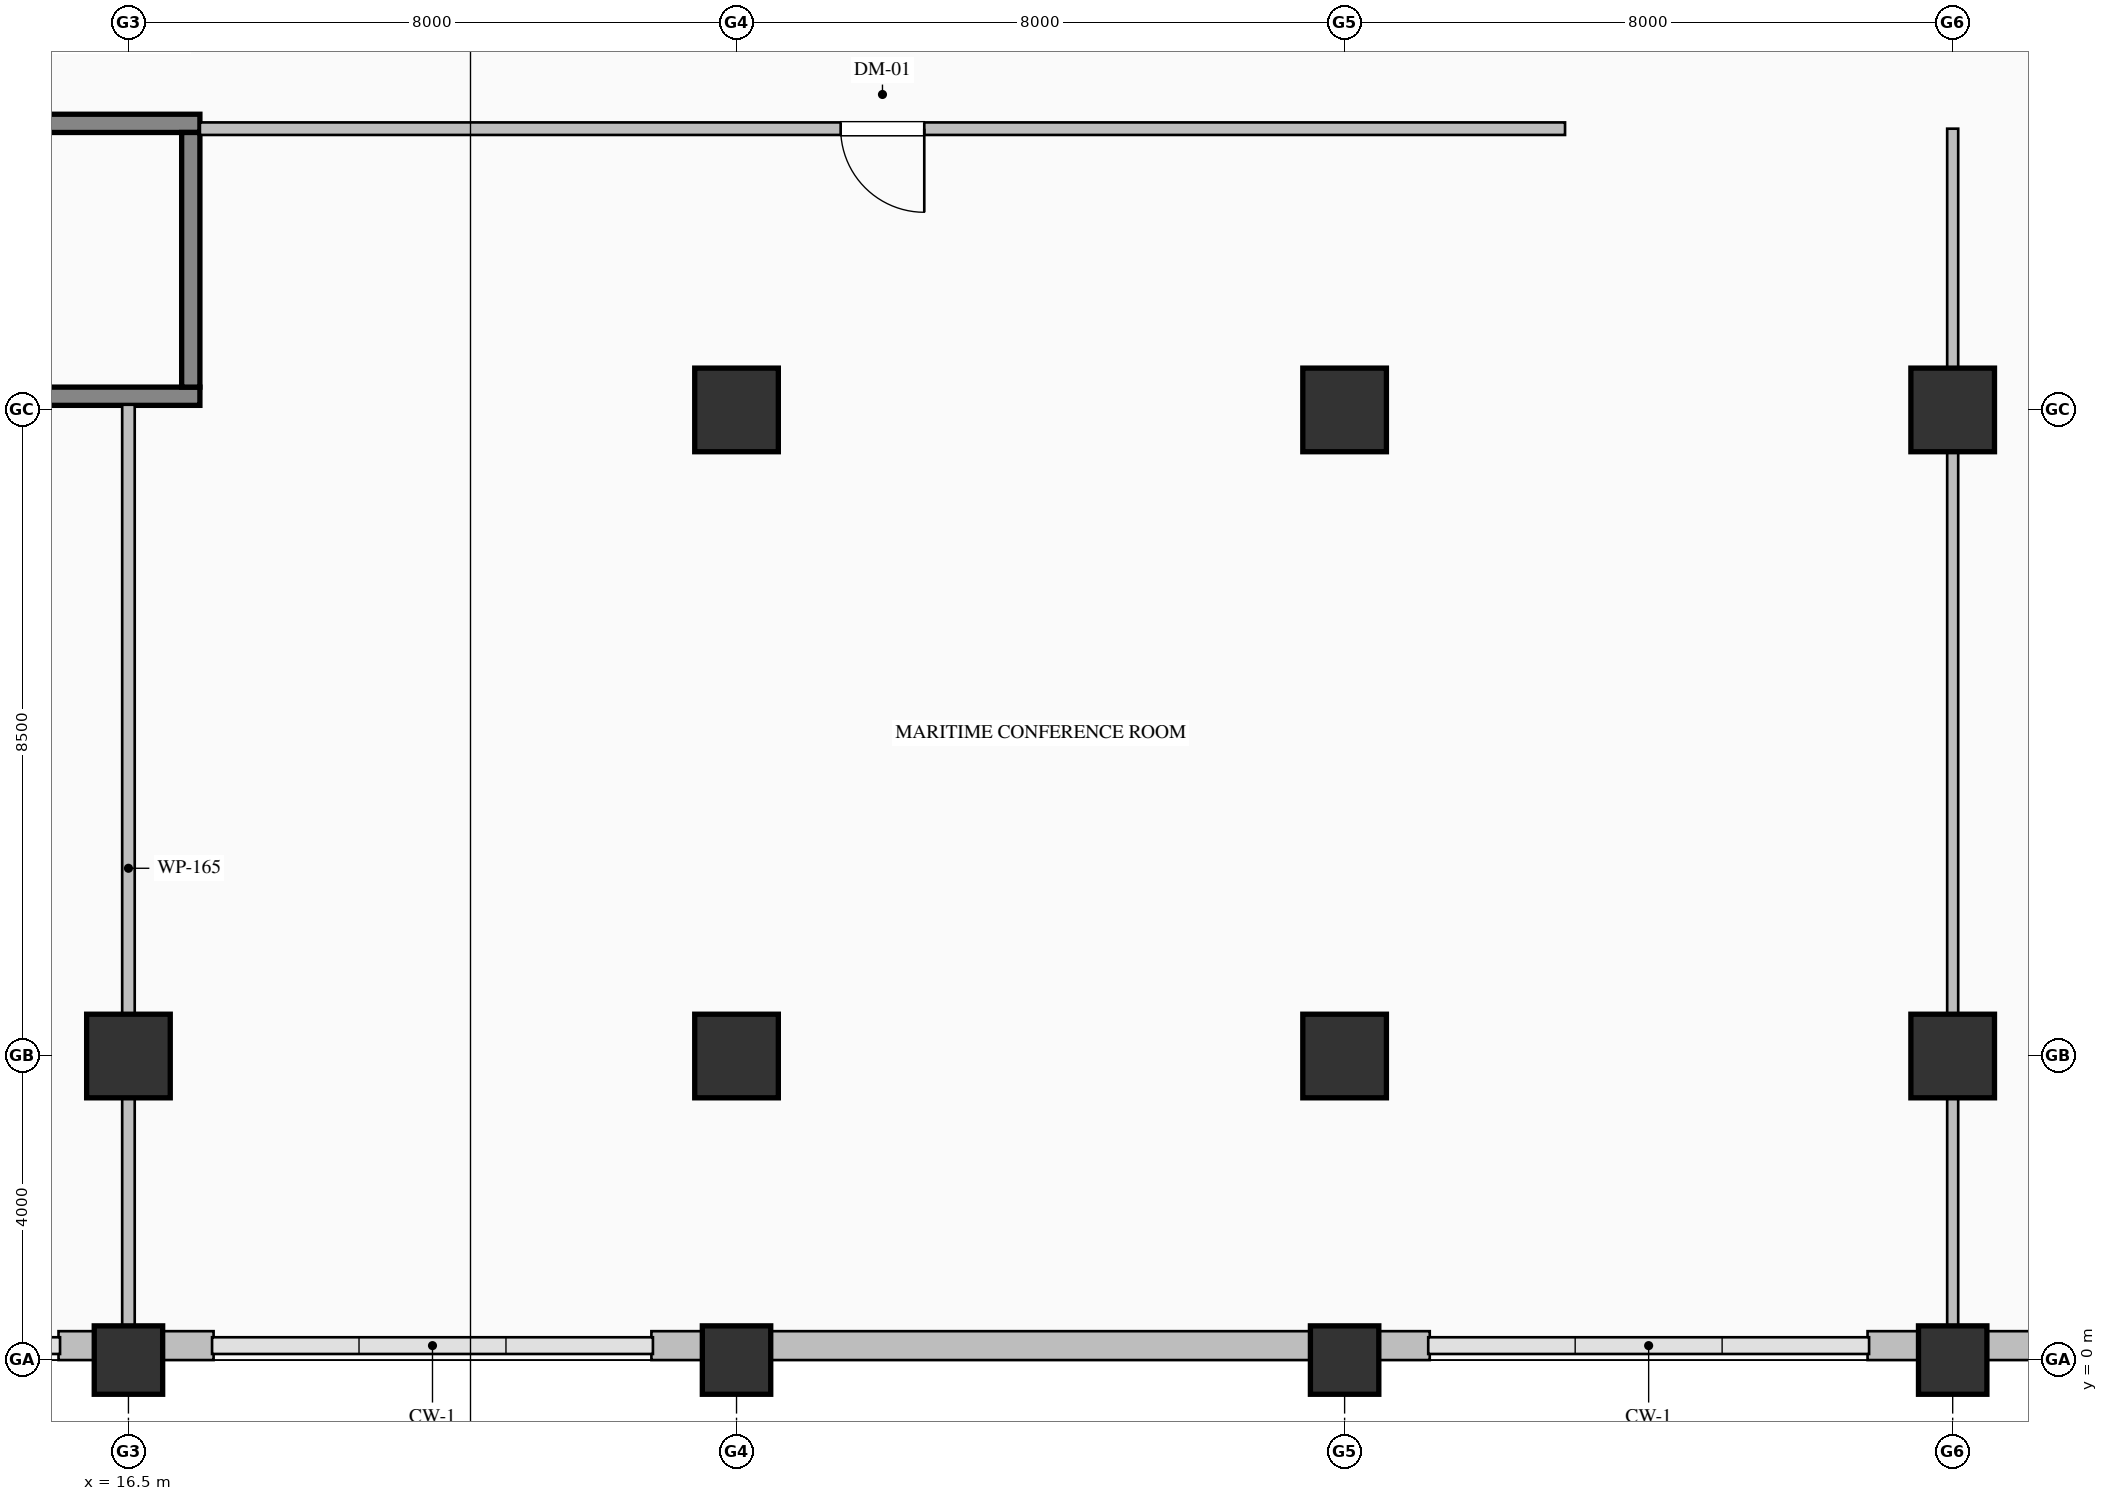
"""IFC4 building model, lengths in metres.
Left out: names, types, materials, properties, quantities, classifications, styles, units other than length and angle.
Written with IfcOpenShell. Run it as: python <this file> out.ifc"""

import sys

from ifc_helpers import new_model, si_unit, direction, frame, frame_2d, origin, origin_2d, place, context, subcontext, project, spatial, rectangle, extrude, element, fill, save


model = new_model("IFC4")
c1 = context("Model", 3, precision=1e-05, world=origin(), true_north=direction((0.0, 1.0)))
c2 = subcontext(c1, "Body", "Model", "MODEL_VIEW")
j1 = project(units=[si_unit("LENGTHUNIT", "METRE"), si_unit("PLANEANGLEUNIT", "RADIAN")], contexts=[c1])
p1 = place(None, origin())
s1 = spatial("IfcSite", under=j1, at=p1, CompositionType="ELEMENT")
p2 = place(p1, origin())
s2 = spatial("IfcBuilding", under=s1, at=p2, CompositionType="ELEMENT")
p3 = place(p2, frame((0.0, 0.0, 6.0)))
s3 = spatial("IfcBuildingStorey", under=s2, at=p3, CompositionType="ELEMENT", Elevation=6.0)
p4 = place(p3, frame((16.5, 0.0, 0.0), z_axis=(0.0, 0.0, 1.0), x_axis=(1.0, 0.0, 0.0)))
e1 = element("IfcColumn", 1, at=p4, inside=s3, PredefinedType="PILASTER", context=c2, shape_type="SweptSolid", body=[
    extrude(rectangle(XDim=0.9, YDim=0.9, at=origin_2d()), origin(), (0.0, 0.0, 1.0), 5.4),
])
p5 = place(p3, frame((16.5, 4.0, 0.0), z_axis=(0.0, 0.0, 1.0), x_axis=(1.0, 0.0, 0.0)))
e2 = element("IfcColumn", 2, at=p5, inside=s3, PredefinedType="COLUMN", context=c2, shape_type="SweptSolid", body=[
    extrude(rectangle(XDim=1.1, YDim=1.1, at=origin_2d()), origin(), (0.0, 0.0, 1.0), 5.4),
])
p6 = place(p3, frame((24.5, 0.0, 0.0), z_axis=(0.0, 0.0, 1.0), x_axis=(1.0, 0.0, 0.0)))
e3 = element("IfcColumn", 3, at=p6, inside=s3, PredefinedType="PILASTER", context=c2, shape_type="SweptSolid", body=[
    extrude(rectangle(XDim=0.9, YDim=0.9, at=origin_2d()), origin(), (0.0, 0.0, 1.0), 5.4),
])
for number, where, z_axis, x_axis in (
    (4, (24.5, 4.0, 0.0), (0.0, 0.0, 1.0), (1.0, 0.0, 0.0)),
    (5, (24.5, 12.5, 0.0), (0.0, 0.0, 1.0), (1.0, 0.0, 0.0)),
):
    element("IfcColumn", number, at=place(p3, frame(where, z_axis=z_axis, x_axis=x_axis)), inside=s3, PredefinedType="COLUMN", context=c2, shape_type="SweptSolid", body=[
        extrude(rectangle(XDim=1.1, YDim=1.1, at=origin_2d()), origin(), (0.0, 0.0, 1.0), 5.4),
    ])
p7 = place(p3, frame((32.5, 0.0, 0.0), z_axis=(0.0, 0.0, 1.0), x_axis=(1.0, 0.0, 0.0)))
e6 = element("IfcColumn", 6, at=p7, inside=s3, PredefinedType="PILASTER", context=c2, shape_type="SweptSolid", body=[
    extrude(rectangle(XDim=0.9, YDim=0.9, at=origin_2d()), origin(), (0.0, 0.0, 1.0), 5.4),
])
for number, where, z_axis, x_axis in (
    (7, (32.5, 4.0, 0.0), (0.0, 0.0, 1.0), (1.0, 0.0, 0.0)),
    (8, (32.5, 12.5, 0.0), (0.0, 0.0, 1.0), (1.0, 0.0, 0.0)),
):
    element("IfcColumn", number, at=place(p3, frame(where, z_axis=z_axis, x_axis=x_axis)), inside=s3, PredefinedType="COLUMN", context=c2, shape_type="SweptSolid", body=[
        extrude(rectangle(XDim=1.1, YDim=1.1, at=origin_2d()), origin(), (0.0, 0.0, 1.0), 5.4),
    ])
p8 = place(p3, frame((40.5, 0.0, 0.0), z_axis=(0.0, 0.0, 1.0), x_axis=(1.0, 0.0, 0.0)))
e9 = element("IfcColumn", 9, at=p8, inside=s3, PredefinedType="PILASTER", context=c2, shape_type="SweptSolid", body=[
    extrude(rectangle(XDim=0.9, YDim=0.9, at=origin_2d()), origin(), (0.0, 0.0, 1.0), 5.4),
])
for number, where, z_axis, x_axis in (
    (10, (40.5, 4.0, 0.0), (0.0, 0.0, 1.0), (1.0, 0.0, 0.0)),
    (11, (40.5, 12.5, 0.0), (0.0, 0.0, 1.0), (1.0, 0.0, 0.0)),
):
    element("IfcColumn", number, at=place(p3, frame(where, z_axis=z_axis, x_axis=x_axis)), inside=s3, PredefinedType="COLUMN", context=c2, shape_type="SweptSolid", body=[
        extrude(rectangle(XDim=1.1, YDim=1.1, at=origin_2d()), origin(), (0.0, 0.0, 1.0), 5.4),
    ])
p9 = place(p3, frame((17.62, 0.19, 0.0), z_axis=(0.0, 0.0, 1.0), x_axis=(-1.0, 0.0, 0.0)))
e12 = element("IfcWall", 12, at=p9, inside=s3, PredefinedType="SOLIDWALL", context=c2, shape_type="SweptSolid", body=[
    extrude(rectangle(XDim=2.04, YDim=0.38, at=frame_2d((1.02, 0.0))), origin(), (0.0, 0.0, 1.0), 4.62),
])
for number, where, z_axis, x_axis in (
    (13, (33.62, 0.19, 0.0), (0.0, 0.0, 1.0), (-1.0, 0.0, 0.0)),
    (14, (49.62, 0.19, 0.0), (0.0, 0.0, 1.0), (-1.0, 0.0, 0.0)),
):
    element("IfcWall", number, at=place(p3, frame(where, z_axis=z_axis, x_axis=x_axis)), inside=s3, PredefinedType="SOLIDWALL", context=c2, shape_type="SweptSolid", body=[
        extrude(rectangle(XDim=10.24, YDim=0.38, at=frame_2d((5.12, 0.0))), origin(), (0.0, 0.0, 1.0), 4.62),
    ])
for number, where, z_axis, x_axis in (
    (15, (9.16, 16.27, 0.0), (0.0, 0.0, 1.0), (1.0, 0.0, 0.0)),
    (16, (17.44, 12.68, 0.0), (0.0, 0.0, 1.0), (-1.0, 0.0, 0.0)),
):
    element("IfcWall", number, at=place(p3, frame(where, z_axis=z_axis, x_axis=x_axis)), inside=s3, PredefinedType="SOLIDWALL", context=c2, shape_type="SweptSolid", body=[
        extrude(rectangle(XDim=8.28, YDim=0.24, at=frame_2d((4.14, 0.0))), origin(), (0.0, 0.0, 1.0), 5.4),
    ])
p10 = place(p3, frame((17.32, 12.8, 0.0), z_axis=(0.0, 0.0, 1.0), x_axis=(0.0, 1.0, 0.0)))
e17 = element("IfcWall", 17, at=p10, inside=s3, PredefinedType="SOLIDWALL", context=c2, shape_type="SweptSolid", body=[
    extrude(rectangle(XDim=3.35, YDim=0.24, at=frame_2d((1.675, 0.0))), origin(), (0.0, 0.0, 1.0), 5.4),
])
p11 = place(p3, frame((35.4, 16.2, 0.0), z_axis=(0.0, 0.0, 1.0), x_axis=(-1.0, 0.0, 0.0)))
e18 = element("IfcWall", 18, at=p11, inside=s3, PredefinedType="PARTITIONING", context=c2, shape_type="SweptSolid", body=[
    extrude(rectangle(XDim=17.96, YDim=0.165, at=frame_2d((8.98, 0.0))), origin(), (0.0, 0.0, 1.0), 5.12),
])
p12 = place(p11, frame((8.43, 0.0, 0.0)))
e19 = element("IfcOpeningElement", 19, at=p12, cuts=e18, PredefinedType="OPENING", context=c2, shape_type="SweptSolid", body=[
    extrude(rectangle(XDim=1.1, YDim=2.2, at=frame_2d((0.55, 1.1))), frame((0.0, 0.093, 0.0), z_axis=(0.0, -1.0, 0.0), x_axis=(1.0, 0.0, 0.0)), (0.0, 0.0, 1.0), 0.185),
])
p13 = place(p3, frame((40.5, 16.2, 0.0), z_axis=(0.0, 0.0, 1.0), x_axis=(0.0, -1.0, 0.0)))
e20 = element("IfcWall", 20, at=p13, inside=s3, PredefinedType="PARTITIONING", context=c2, shape_type="SweptSolid", body=[
    extrude(rectangle(XDim=15.828, YDim=0.145, at=frame_2d((7.914, 0.0))), origin(), (0.0, 0.0, 1.0), 4.212),
])
p14 = place(p3, frame((16.5, 0.372, 0.0), z_axis=(0.0, 0.0, 1.0), x_axis=(0.0, 1.0, 0.0)))
e21 = element("IfcWall", 21, at=p14, inside=s3, PredefinedType="PARTITIONING", context=c2, shape_type="SweptSolid", body=[
    extrude(rectangle(XDim=12.196, YDim=0.165, at=frame_2d((6.098, 0.0))), origin(), (0.0, 0.0, 1.0), 4.212),
])
p15 = place(p12, origin())
e22 = element("IfcDoor", 22, at=p15, inside=s3, OperationType="SINGLE_SWING_LEFT", PredefinedType="DOOR", context=c2, shape_type="SweptSolid", body=[
    extrude(rectangle(XDim=1.1, YDim=2.2, at=frame_2d((0.55, 1.1))), frame((0.0, 0.025, 0.0), z_axis=(0.0, -1.0, 0.0), x_axis=(1.0, 0.0, 0.0)), (0.0, 0.0, 1.0), 0.05),
])
fill(e19, e22)
save(model, sys.argv[1])
